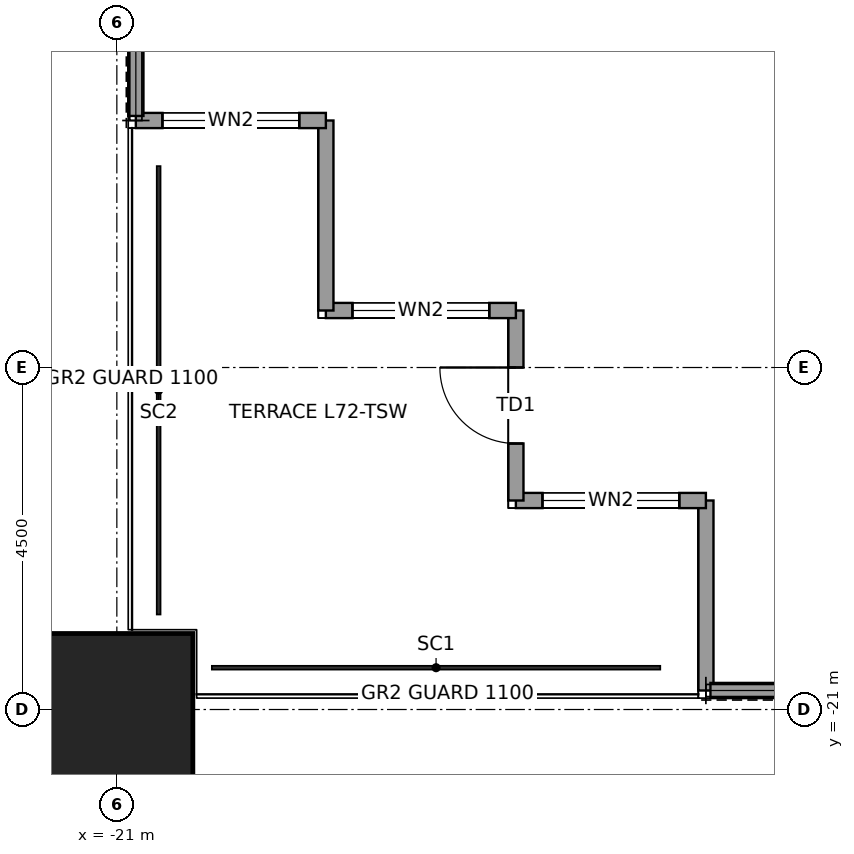
"""IFC4 building model, lengths in metres.
Left out: names, types, materials, properties, quantities, classifications, styles, units other than length and angle.
Written with IfcOpenShell. Run it as: python <this file> out.ifc"""

import sys

from ifc_helpers import new_model, si_unit, direction, frame, frame_2d, origin, origin_2d, place, context, subcontext, project, spatial, rectangle, hollow_rectangle, extrude, element, fill, save


model = new_model("IFC4")
c1 = context("Model", 3, precision=1e-05, world=origin(), true_north=direction((0.0, 1.0)))
c2 = subcontext(c1, "Body", "Model", "MODEL_VIEW")
j1 = project(units=[si_unit("LENGTHUNIT", "METRE"), si_unit("PLANEANGLEUNIT", "RADIAN")], contexts=[c1])
p1 = place(None, origin())
s1 = spatial("IfcSite", under=j1, at=p1, CompositionType="ELEMENT")
p2 = place(p1, origin())
s2 = spatial("IfcBuilding", under=s1, at=p2, CompositionType="ELEMENT")
p3 = place(p2, frame((0.0, 0.0, 323.9)))
s3 = spatial("IfcBuildingStorey", under=s2, at=p3, CompositionType="ELEMENT", Elevation=323.9)
p4 = place(p3, frame((-21.0, -21.0, 0.0), z_axis=(0.0, 0.0, 1.0), x_axis=(1.0, 0.0, 0.0)))
e1 = element("IfcColumn", 1, at=p4, inside=s3, PredefinedType="COLUMN", context=c2, shape_type="SweptSolid", body=[
    extrude(hollow_rectangle(XDim=2.0, YDim=2.0, WallThickness=0.095, at=origin_2d()), origin(), (0.0, 0.0, 1.0), 4.0),
])
p5 = place(p3, frame((-13.25, -20.75, 0.0), z_axis=(0.0, 0.0, 1.0), x_axis=(0.0, 1.0, 0.0)))
e2 = element("IfcWall", 2, at=p5, inside=s3, PredefinedType="SOLIDWALL", context=c2, shape_type="SweptSolid", body=[
    extrude(rectangle(XDim=2.5, YDim=0.2, at=frame_2d((1.25, 0.0))), origin(), (0.0, 0.0, 1.0), 3.85),
])
p6 = place(p3, frame((-13.25, -18.25, 0.0), z_axis=(0.0, 0.0, 1.0), x_axis=(-1.0, 0.0, 0.0)))
e3 = element("IfcWall", 3, at=p6, inside=s3, PredefinedType="SOLIDWALL", context=c2, shape_type="SweptSolid", body=[
    extrude(rectangle(XDim=2.5, YDim=0.2, at=frame_2d((1.25, 0.0))), origin(), (0.0, 0.0, 1.0), 3.85),
])
p7 = place(p6, frame((0.35, 0.0, 0.3)))
e4 = element("IfcOpeningElement", 4, at=p7, cuts=e3, PredefinedType="OPENING", context=c2, shape_type="SweptSolid", body=[
    extrude(rectangle(XDim=1.8, YDim=2.4, at=frame_2d((0.9, 1.2))), frame((0.0, 0.11, 0.0), z_axis=(0.0, -1.0, 0.0), x_axis=(1.0, 0.0, 0.0)), (0.0, 0.0, 1.0), 0.22),
])
p8 = place(p3, frame((-15.75, -18.25, 0.0), z_axis=(0.0, 0.0, 1.0), x_axis=(0.0, 1.0, 0.0)))
e5 = element("IfcWall", 5, at=p8, inside=s3, PredefinedType="SOLIDWALL", context=c2, shape_type="SweptSolid", body=[
    extrude(rectangle(XDim=2.5, YDim=0.2, at=frame_2d((1.25, 0.0))), origin(), (0.0, 0.0, 1.0), 3.317),
])
p9 = place(p8, frame((0.75, 0.0, 0.0)))
e6 = element("IfcOpeningElement", 6, at=p9, cuts=e5, PredefinedType="OPENING", context=c2, shape_type="SweptSolid", body=[
    extrude(rectangle(XDim=1.0, YDim=2.4, at=frame_2d((0.5, 1.2))), frame((0.0, 0.11, 0.0), z_axis=(0.0, -1.0, 0.0), x_axis=(1.0, 0.0, 0.0)), (0.0, 0.0, 1.0), 0.22),
])
p10 = place(p3, frame((-15.75, -15.75, 0.0), z_axis=(0.0, 0.0, 1.0), x_axis=(-1.0, 0.0, 0.0)))
e7 = element("IfcWall", 7, at=p10, inside=s3, PredefinedType="SOLIDWALL", context=c2, shape_type="SweptSolid", body=[
    extrude(rectangle(XDim=2.5, YDim=0.2, at=frame_2d((1.25, 0.0))), origin(), (0.0, 0.0, 1.0), 3.85),
])
p11 = place(p10, frame((0.35, 0.0, 0.3)))
e8 = element("IfcOpeningElement", 8, at=p11, cuts=e7, PredefinedType="OPENING", context=c2, shape_type="SweptSolid", body=[
    extrude(rectangle(XDim=1.8, YDim=2.4, at=frame_2d((0.9, 1.2))), frame((0.0, 0.11, 0.0), z_axis=(0.0, -1.0, 0.0), x_axis=(1.0, 0.0, 0.0)), (0.0, 0.0, 1.0), 0.22),
])
p12 = place(p3, frame((-18.25, -15.75, 0.0), z_axis=(0.0, 0.0, 1.0), x_axis=(0.0, 1.0, 0.0)))
e9 = element("IfcWall", 9, at=p12, inside=s3, PredefinedType="SOLIDWALL", context=c2, shape_type="SweptSolid", body=[
    extrude(rectangle(XDim=2.5, YDim=0.2, at=frame_2d((1.25, 0.0))), origin(), (0.0, 0.0, 1.0), 3.85),
])
p13 = place(p3, frame((-18.25, -13.25, 0.0), z_axis=(0.0, 0.0, 1.0), x_axis=(-1.0, 0.0, 0.0)))
e10 = element("IfcWall", 10, at=p13, inside=s3, PredefinedType="SOLIDWALL", context=c2, shape_type="SweptSolid", body=[
    extrude(rectangle(XDim=2.5, YDim=0.2, at=frame_2d((1.25, 0.0))), origin(), (0.0, 0.0, 1.0), 3.85),
])
p14 = place(p13, frame((0.35, 0.0, 0.3)))
e11 = element("IfcOpeningElement", 11, at=p14, cuts=e10, PredefinedType="OPENING", context=c2, shape_type="SweptSolid", body=[
    extrude(rectangle(XDim=1.8, YDim=2.4, at=frame_2d((0.9, 1.2))), frame((0.0, 0.11, 0.0), z_axis=(0.0, -1.0, 0.0), x_axis=(1.0, 0.0, 0.0)), (0.0, 0.0, 1.0), 0.22),
])
for number, where, z_axis, x_axis in (
    (12, (-10.405, -20.75, 0.0), (0.0, 0.0, 1.0), (-1.0, 0.0, 0.0)),
    (13, (-20.75, -13.19, 0.0), (0.0, 0.0, 1.0), (0.0, 1.0, 0.0)),
):
    element("IfcWall", number, at=place(p3, frame(where, z_axis=z_axis, x_axis=x_axis)), inside=s3, PredefinedType="SOLIDWALL", context=c2, shape_type="SweptSolid", body=[
        extrude(rectangle(XDim=2.785, YDim=0.2, at=frame_2d((1.393, 0.0))), origin(), (0.0, 0.0, 1.0), 3.85),
    ])
p15 = place(p7, origin())
e14 = element("IfcWindow", 14, at=p15, inside=s3, PartitioningType="SINGLE_PANEL", PredefinedType="WINDOW", context=c2, shape_type="SweptSolid", body=[
    extrude(rectangle(XDim=1.8, YDim=2.4, at=frame_2d((0.9, 1.2))), frame((0.0, 0.03, 0.0), z_axis=(0.0, -1.0, 0.0), x_axis=(1.0, 0.0, 0.0)), (0.0, 0.0, 1.0), 0.06),
])
fill(e4, e14)
p16 = place(p9, origin())
e15 = element("IfcDoor", 15, at=p16, inside=s3, OperationType="SINGLE_SWING_RIGHT", PredefinedType="DOOR", context=c2, shape_type="SweptSolid", body=[
    extrude(rectangle(XDim=1.0, YDim=2.4, at=frame_2d((0.5, 1.2))), frame((0.0, 0.025, 0.0), z_axis=(0.0, -1.0, 0.0), x_axis=(1.0, 0.0, 0.0)), (0.0, 0.0, 1.0), 0.05),
])
fill(e6, e15)
p17 = place(p11, origin())
e16 = element("IfcWindow", 16, at=p17, inside=s3, PartitioningType="SINGLE_PANEL", PredefinedType="WINDOW", context=c2, shape_type="SweptSolid", body=[
    extrude(rectangle(XDim=1.8, YDim=2.4, at=frame_2d((0.9, 1.2))), frame((0.0, 0.03, 0.0), z_axis=(0.0, -1.0, 0.0), x_axis=(1.0, 0.0, 0.0)), (0.0, 0.0, 1.0), 0.06),
])
fill(e8, e16)
p18 = place(p14, origin())
e17 = element("IfcWindow", 17, at=p18, inside=s3, PartitioningType="SINGLE_PANEL", PredefinedType="WINDOW", context=c2, shape_type="SweptSolid", body=[
    extrude(rectangle(XDim=1.8, YDim=2.4, at=frame_2d((0.9, 1.2))), frame((0.0, 0.03, 0.0), z_axis=(0.0, -1.0, 0.0), x_axis=(1.0, 0.0, 0.0)), (0.0, 0.0, 1.0), 0.06),
])
fill(e11, e17)
save(model, sys.argv[1])
